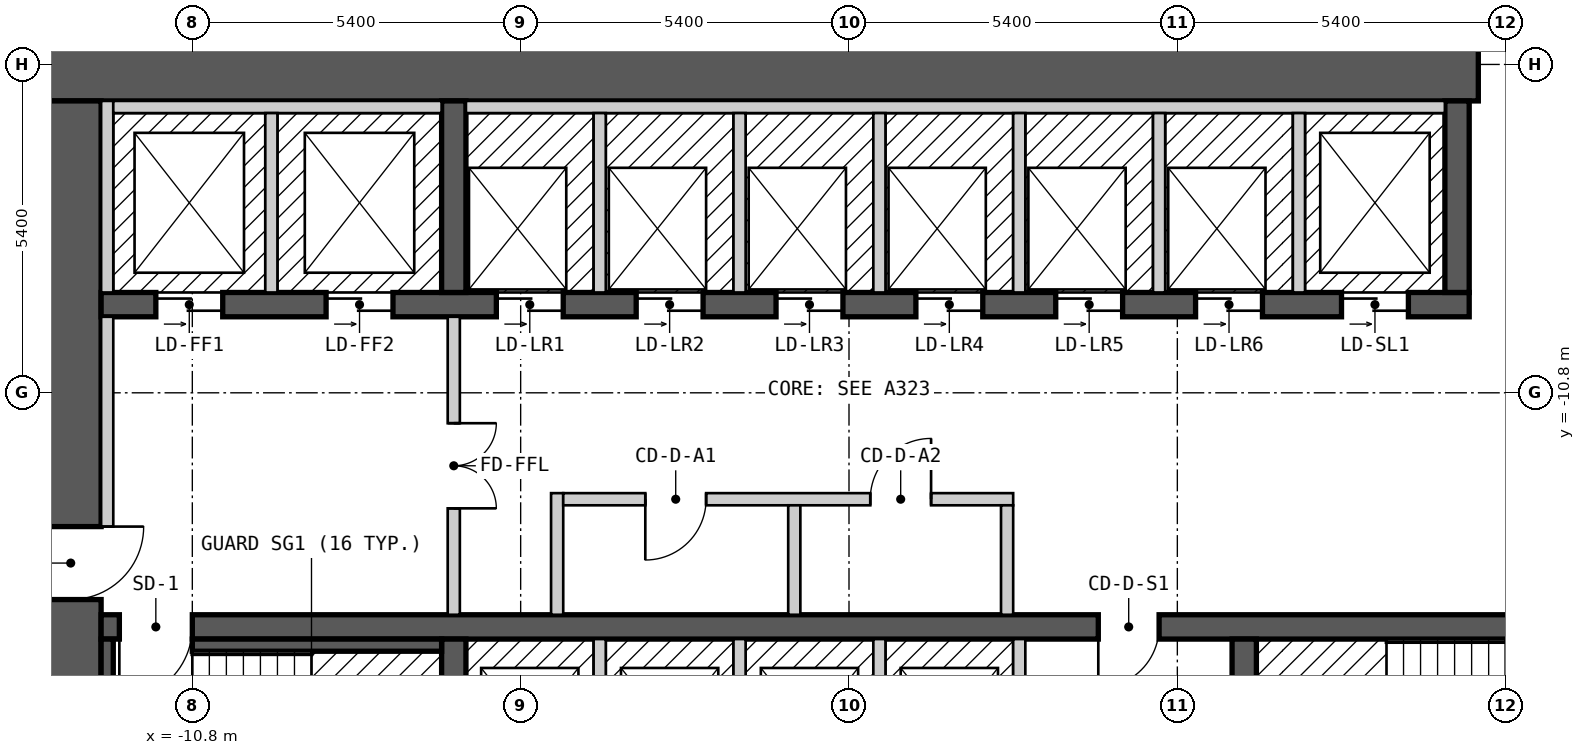
"""IFC4 building model, lengths in metres.
Left out: names, types, materials, properties, quantities, classifications, styles, units other than length and angle.
Written with IfcOpenShell. Run it as: python <this file> out.ifc"""

import sys

from ifc_helpers import new_model, si_unit, direction, frame, frame_2d, origin, place, context, subcontext, project, spatial, rectangle, extrude, element, fill, save


model = new_model("IFC4")
c1 = context("Model", 3, precision=1e-05, world=origin(), true_north=direction((0.0, 1.0)))
c2 = subcontext(c1, "Body", "Model", "MODEL_VIEW")
j1 = project(units=[si_unit("LENGTHUNIT", "METRE"), si_unit("PLANEANGLEUNIT", "RADIAN")], contexts=[c1])
p1 = place(None, origin())
s1 = spatial("IfcSite", under=j1, at=p1, CompositionType="ELEMENT")
p2 = place(p1, origin())
s2 = spatial("IfcBuilding", under=s1, at=p2, CompositionType="ELEMENT")
p3 = place(p2, frame((0.0, 0.0, 75.0)))
s3 = spatial("IfcBuildingStorey", under=s2, at=p3, CompositionType="ELEMENT", Elevation=75.0)
p4 = place(p3, frame((-13.3, -5.5, 0.0), z_axis=(0.0, 0.0, 1.0), x_axis=(1.0, 0.0, 0.0)))
e1 = element("IfcWall", 1, at=p4, inside=s3, PredefinedType="SHEAR", context=c2, shape_type="SweptSolid", body=[
    extrude(rectangle(XDim=26.6, YDim=1.0, at=frame_2d((13.3, 0.0))), origin(), (0.0, 0.0, 1.0), 2.7),
])
p5 = place(p4, frame((23.65, 0.0, 0.0)))
e2 = element("IfcOpeningElement", 2, at=p5, cuts=e1, PredefinedType="OPENING", context=c2, shape_type="SweptSolid", body=[
    extrude(rectangle(XDim=1.2, YDim=2.1, at=frame_2d((0.6, 1.05))), frame((0.0, 0.51, 0.0), z_axis=(0.0, -1.0, 0.0), x_axis=(1.0, 0.0, 0.0)), (0.0, 0.0, 1.0), 1.02),
])
p6 = place(p3, frame((-12.8, -18.0, 0.0), z_axis=(0.0, 0.0, 1.0), x_axis=(0.0, 1.0, 0.0)))
e3 = element("IfcWall", 3, at=p6, inside=s3, PredefinedType="SHEAR", context=c2, shape_type="SweptSolid", body=[
    extrude(rectangle(XDim=12.0, YDim=1.0, at=frame_2d((6.0, 0.0))), origin(), (0.0, 0.0, 1.0), 2.7),
])
p7 = place(p6, frame((3.8, 0.0, 0.0)))
e4 = element("IfcOpeningElement", 4, at=p7, cuts=e3, PredefinedType="OPENING", context=c2, shape_type="SweptSolid", body=[
    extrude(rectangle(XDim=1.2, YDim=2.1, at=frame_2d((0.6, 1.05))), frame((0.0, 0.51, 0.0), z_axis=(0.0, -1.0, 0.0), x_axis=(1.0, 0.0, 0.0)), (0.0, 0.0, 1.0), 1.02),
])
p8 = place(p3, frame((-12.3, -14.65, 0.0), z_axis=(0.0, 0.0, 1.0), x_axis=(1.0, 0.0, 0.0)))
e5 = element("IfcWall", 5, at=p8, inside=s3, PredefinedType="SHEAR", context=c2, shape_type="SweptSolid", body=[
    extrude(rectangle(XDim=24.6, YDim=0.4, at=frame_2d((12.3, 0.0))), origin(), (0.0, 0.0, 1.0), 2.7),
])
p9 = place(p8, frame((1.5, 0.0, 0.0), z_axis=(0.0, 0.0, 1.0), x_axis=(-1.0, 0.0, 0.0)))
e6 = element("IfcOpeningElement", 6, at=p9, cuts=e5, PredefinedType="OPENING", context=c2, shape_type="SweptSolid", body=[
    extrude(rectangle(XDim=1.2, YDim=2.1, at=frame_2d((0.6, 1.05))), frame((0.0, 0.21, 0.0), z_axis=(0.0, -1.0, 0.0), x_axis=(1.0, 0.0, 0.0)), (0.0, 0.0, 1.0), 0.42),
])
p10 = place(p8, frame((24.35, 0.0, 0.0), z_axis=(0.0, 0.0, 1.0), x_axis=(-1.0, 0.0, 0.0)))
e7 = element("IfcOpeningElement", 7, at=p10, cuts=e5, PredefinedType="OPENING", context=c2, shape_type="SweptSolid", body=[
    extrude(rectangle(XDim=1.2, YDim=2.1, at=frame_2d((0.6, 1.05))), frame((0.0, 0.21, 0.0), z_axis=(0.0, -1.0, 0.0), x_axis=(1.0, 0.0, 0.0)), (0.0, 0.0, 1.0), 0.42),
])
p11 = place(p8, frame((17.4, 0.0, 0.0), z_axis=(0.0, 0.0, 1.0), x_axis=(-1.0, 0.0, 0.0)))
e8 = element("IfcOpeningElement", 8, at=p11, cuts=e5, PredefinedType="OPENING", context=c2, shape_type="SweptSolid", body=[
    extrude(rectangle(XDim=1.0, YDim=2.1, at=frame_2d((0.5, 1.05))), frame((0.0, 0.21, 0.0), z_axis=(0.0, -1.0, 0.0), x_axis=(1.0, 0.0, 0.0)), (0.0, 0.0, 1.0), 0.42),
])
p12 = place(p3, frame((-12.3, -9.35, 0.0), z_axis=(0.0, 0.0, 1.0), x_axis=(1.0, 0.0, 0.0)))
e9 = element("IfcWall", 9, at=p12, inside=s3, PredefinedType="SHEAR", context=c2, shape_type="SweptSolid", body=[
    extrude(rectangle(XDim=22.5, YDim=0.4, at=frame_2d((11.25, 0.0))), origin(), (0.0, 0.0, 1.0), 2.7),
])
p13 = place(p12, frame((0.9, 0.0, 0.0)))
e10 = element("IfcOpeningElement", 10, at=p13, cuts=e9, PredefinedType="OPENING", context=c2, shape_type="SweptSolid", body=[
    extrude(rectangle(XDim=1.1, YDim=2.1, at=frame_2d((0.55, 1.05))), frame((0.0, 0.21, 0.0), z_axis=(0.0, -1.0, 0.0), x_axis=(1.0, 0.0, 0.0)), (0.0, 0.0, 1.0), 0.42),
])
p14 = place(p12, frame((3.7, 0.0, 0.0)))
e11 = element("IfcOpeningElement", 11, at=p14, cuts=e9, PredefinedType="OPENING", context=c2, shape_type="SweptSolid", body=[
    extrude(rectangle(XDim=1.1, YDim=2.1, at=frame_2d((0.55, 1.05))), frame((0.0, 0.21, 0.0), z_axis=(0.0, -1.0, 0.0), x_axis=(1.0, 0.0, 0.0)), (0.0, 0.0, 1.0), 0.42),
])
p15 = place(p12, frame((6.5, 0.0, 0.0)))
e12 = element("IfcOpeningElement", 12, at=p15, cuts=e9, PredefinedType="OPENING", context=c2, shape_type="SweptSolid", body=[
    extrude(rectangle(XDim=1.1, YDim=2.1, at=frame_2d((0.55, 1.05))), frame((0.0, 0.21, 0.0), z_axis=(0.0, -1.0, 0.0), x_axis=(1.0, 0.0, 0.0)), (0.0, 0.0, 1.0), 0.42),
])
p16 = place(p12, frame((8.8, 0.0, 0.0)))
e13 = element("IfcOpeningElement", 13, at=p16, cuts=e9, PredefinedType="OPENING", context=c2, shape_type="SweptSolid", body=[
    extrude(rectangle(XDim=1.1, YDim=2.1, at=frame_2d((0.55, 1.05))), frame((0.0, 0.21, 0.0), z_axis=(0.0, -1.0, 0.0), x_axis=(1.0, 0.0, 0.0)), (0.0, 0.0, 1.0), 0.42),
])
p17 = place(p12, frame((11.1, 0.0, 0.0)))
e14 = element("IfcOpeningElement", 14, at=p17, cuts=e9, PredefinedType="OPENING", context=c2, shape_type="SweptSolid", body=[
    extrude(rectangle(XDim=1.1, YDim=2.1, at=frame_2d((0.55, 1.05))), frame((0.0, 0.21, 0.0), z_axis=(0.0, -1.0, 0.0), x_axis=(1.0, 0.0, 0.0)), (0.0, 0.0, 1.0), 0.42),
])
p18 = place(p12, frame((13.4, 0.0, 0.0)))
e15 = element("IfcOpeningElement", 15, at=p18, cuts=e9, PredefinedType="OPENING", context=c2, shape_type="SweptSolid", body=[
    extrude(rectangle(XDim=1.1, YDim=2.1, at=frame_2d((0.55, 1.05))), frame((0.0, 0.21, 0.0), z_axis=(0.0, -1.0, 0.0), x_axis=(1.0, 0.0, 0.0)), (0.0, 0.0, 1.0), 0.42),
])
p19 = place(p12, frame((15.7, 0.0, 0.0)))
e16 = element("IfcOpeningElement", 16, at=p19, cuts=e9, PredefinedType="OPENING", context=c2, shape_type="SweptSolid", body=[
    extrude(rectangle(XDim=1.1, YDim=2.1, at=frame_2d((0.55, 1.05))), frame((0.0, 0.21, 0.0), z_axis=(0.0, -1.0, 0.0), x_axis=(1.0, 0.0, 0.0)), (0.0, 0.0, 1.0), 0.42),
])
p20 = place(p12, frame((18.0, 0.0, 0.0)))
e17 = element("IfcOpeningElement", 17, at=p20, cuts=e9, PredefinedType="OPENING", context=c2, shape_type="SweptSolid", body=[
    extrude(rectangle(XDim=1.1, YDim=2.1, at=frame_2d((0.55, 1.05))), frame((0.0, 0.21, 0.0), z_axis=(0.0, -1.0, 0.0), x_axis=(1.0, 0.0, 0.0)), (0.0, 0.0, 1.0), 0.42),
])
p21 = place(p12, frame((20.4, 0.0, 0.0)))
e18 = element("IfcOpeningElement", 18, at=p21, cuts=e9, PredefinedType="OPENING", context=c2, shape_type="SweptSolid", body=[
    extrude(rectangle(XDim=1.1, YDim=2.1, at=frame_2d((0.55, 1.05))), frame((0.0, 0.21, 0.0), z_axis=(0.0, -1.0, 0.0), x_axis=(1.0, 0.0, 0.0)), (0.0, 0.0, 1.0), 0.42),
])
for number, where, z_axis, x_axis in (
    (19, (-6.5, -18.0, 0.0), (0.0, 0.0, 1.0), (0.0, 1.0, 0.0)),
    (20, (6.5, -18.0, 0.0), (0.0, 0.0, 1.0), (0.0, 1.0, 0.0)),
    (21, (-6.5, -9.15, 0.0), (0.0, 0.0, 1.0), (0.0, 1.0, 0.0)),
    (22, (10.0, -9.15, 0.0), (0.0, 0.0, 1.0), (0.0, 1.0, 0.0)),
):
    element("IfcWall", number, at=place(p3, frame(where, z_axis=z_axis, x_axis=x_axis)), inside=s3, PredefinedType="SHEAR", context=c2, shape_type="SweptSolid", body=[
        extrude(rectangle(XDim=3.15, YDim=0.4, at=frame_2d((1.575, 0.0))), origin(), (0.0, 0.0, 1.0), 2.7),
    ])
p22 = place(p3, frame((-12.2, -18.0, 0.0), z_axis=(0.0, 0.0, 1.0), x_axis=(0.0, 1.0, 0.0)))
e23 = element("IfcWall", 23, at=p22, inside=s3, PredefinedType="SOLIDWALL", context=c2, shape_type="SweptSolid", body=[
    extrude(rectangle(XDim=3.15, YDim=0.2, at=frame_2d((1.575, 0.0))), origin(), (0.0, 0.0, 1.0), 2.7),
])
p23 = place(p3, frame((-12.2, -13.0, 0.0), z_axis=(0.0, 0.0, 1.0), x_axis=(0.0, 1.0, 0.0)))
e24 = element("IfcWall", 24, at=p23, inside=s3, PredefinedType="PARTITIONING", context=c2, shape_type="SweptSolid", body=[
    extrude(rectangle(XDim=3.45, YDim=0.2, at=frame_2d((1.725, 0.0))), origin(), (0.0, 0.0, 1.0), 2.7),
])
p24 = place(p3, frame((-12.2, -9.15, 0.0), z_axis=(0.0, 0.0, 1.0), x_axis=(0.0, 1.0, 0.0)))
e25 = element("IfcWall", 25, at=p24, inside=s3, PredefinedType="SOLIDWALL", context=c2, shape_type="SweptSolid", body=[
    extrude(rectangle(XDim=3.15, YDim=0.2, at=frame_2d((1.575, 0.0))), origin(), (0.0, 0.0, 1.0), 2.7),
])
p25 = place(p3, frame((-12.1, -6.1, 0.0), z_axis=(0.0, 0.0, 1.0), x_axis=(1.0, 0.0, 0.0)))
e26 = element("IfcWall", 26, at=p25, inside=s3, PredefinedType="SOLIDWALL", context=c2, shape_type="SweptSolid", body=[
    extrude(rectangle(XDim=5.4, YDim=0.2, at=frame_2d((2.7, 0.0))), origin(), (0.0, 0.0, 1.0), 2.7),
])
p26 = place(p3, frame((-10.8, -14.95, 0.0), z_axis=(0.0, 0.0, 1.0), x_axis=(1.0, 0.0, 0.0)))
e27 = element("IfcWall", 27, at=p26, inside=s3, PredefinedType="SOLIDWALL", context=c2, shape_type="SweptSolid", body=[
    extrude(rectangle(XDim=4.1, YDim=0.2, at=frame_2d((2.05, 0.0))), origin(), (0.0, 0.0, 1.0), 2.7),
])
p27 = place(p3, frame((-9.5, -9.15, 0.0), z_axis=(0.0, 0.0, 1.0), x_axis=(0.0, 1.0, 0.0)))
e28 = element("IfcWall", 28, at=p27, inside=s3, PredefinedType="SOLIDWALL", context=c2, shape_type="SweptSolid", body=[
    extrude(rectangle(XDim=2.95, YDim=0.2, at=frame_2d((1.475, 0.0))), origin(), (0.0, 0.0, 1.0), 2.7),
])
p28 = place(p3, frame((-6.5, -14.45, 0.0), z_axis=(0.0, 0.0, 1.0), x_axis=(0.0, 1.0, 0.0)))
e29 = element("IfcWall", 29, at=p28, inside=s3, PredefinedType="PARTITIONING", context=c2, shape_type="SweptSolid", body=[
    extrude(rectangle(XDim=4.9, YDim=0.2, at=frame_2d((2.45, 0.0))), origin(), (0.0, 0.0, 1.0), 2.7),
])
p29 = place(p28, frame((3.15, 0.0, 0.0), z_axis=(0.0, 0.0, 1.0), x_axis=(-1.0, 0.0, 0.0)))
e30 = element("IfcOpeningElement", 30, at=p29, cuts=e29, PredefinedType="OPENING", context=c2, shape_type="SweptSolid", body=[
    extrude(rectangle(XDim=1.4, YDim=2.1, at=frame_2d((0.7, 1.05))), frame((0.0, 0.11, 0.0), z_axis=(0.0, -1.0, 0.0), x_axis=(1.0, 0.0, 0.0)), (0.0, 0.0, 1.0), 0.22),
])
p30 = place(p3, frame((-6.3, -6.1, 0.0), z_axis=(0.0, 0.0, 1.0), x_axis=(1.0, 0.0, 0.0)))
e31 = element("IfcWall", 31, at=p30, inside=s3, PredefinedType="SOLIDWALL", context=c2, shape_type="SweptSolid", body=[
    extrude(rectangle(XDim=16.1, YDim=0.2, at=frame_2d((8.05, 0.0))), origin(), (0.0, 0.0, 1.0), 2.7),
])
p31 = place(p3, frame((-4.8, -14.45, 0.0), z_axis=(0.0, 0.0, 1.0), x_axis=(0.0, 1.0, 0.0)))
e32 = element("IfcWall", 32, at=p31, inside=s3, PredefinedType="PARTITIONING", context=c2, shape_type="SweptSolid", body=[
    extrude(rectangle(XDim=2.0, YDim=0.2, at=frame_2d((1.0, 0.0))), origin(), (0.0, 0.0, 1.0), 2.7),
])
p32 = place(p3, frame((-4.7, -12.55, 0.0), z_axis=(0.0, 0.0, 1.0), x_axis=(1.0, 0.0, 0.0)))
e33 = element("IfcWall", 33, at=p32, inside=s3, PredefinedType="PARTITIONING", context=c2, shape_type="SweptSolid", body=[
    extrude(rectangle(XDim=7.4, YDim=0.2, at=frame_2d((3.7, 0.0))), origin(), (0.0, 0.0, 1.0), 2.7),
])
p33 = place(p32, frame((2.35, 0.0, 0.0), z_axis=(0.0, 0.0, 1.0), x_axis=(-1.0, 0.0, 0.0)))
e34 = element("IfcOpeningElement", 34, at=p33, cuts=e33, PredefinedType="OPENING", context=c2, shape_type="SweptSolid", body=[
    extrude(rectangle(XDim=1.0, YDim=2.1, at=frame_2d((0.5, 1.05))), frame((0.0, 0.11, 0.0), z_axis=(0.0, -1.0, 0.0), x_axis=(1.0, 0.0, 0.0)), (0.0, 0.0, 1.0), 0.22),
])
p34 = place(p32, frame((6.05, 0.0, 0.0), z_axis=(0.0, 0.0, 1.0), x_axis=(-1.0, 0.0, 0.0)))
e35 = element("IfcOpeningElement", 35, at=p34, cuts=e33, PredefinedType="OPENING", context=c2, shape_type="SweptSolid", body=[
    extrude(rectangle(XDim=1.0, YDim=2.1, at=frame_2d((0.5, 1.05))), frame((0.0, 0.11, 0.0), z_axis=(0.0, -1.0, 0.0), x_axis=(1.0, 0.0, 0.0)), (0.0, 0.0, 1.0), 0.22),
])
for number, where, z_axis, x_axis in (
    (36, (-4.1, -17.8, 0.0), (0.0, 0.0, 1.0), (0.0, 1.0, 0.0)),
    (37, (-4.1, -9.15, 0.0), (0.0, 0.0, 1.0), (0.0, 1.0, 0.0)),
    (38, (-1.8, -17.8, 0.0), (0.0, 0.0, 1.0), (0.0, 1.0, 0.0)),
    (39, (-1.8, -9.15, 0.0), (0.0, 0.0, 1.0), (0.0, 1.0, 0.0)),
):
    element("IfcWall", number, at=place(p3, frame(where, z_axis=z_axis, x_axis=x_axis)), inside=s3, PredefinedType="SOLIDWALL", context=c2, shape_type="SweptSolid", body=[
        extrude(rectangle(XDim=2.95, YDim=0.2, at=frame_2d((1.475, 0.0))), origin(), (0.0, 0.0, 1.0), 2.7),
    ])
p35 = place(p3, frame((-0.9, -14.45, 0.0), z_axis=(0.0, 0.0, 1.0), x_axis=(0.0, 1.0, 0.0)))
e40 = element("IfcWall", 40, at=p35, inside=s3, PredefinedType="PARTITIONING", context=c2, shape_type="SweptSolid", body=[
    extrude(rectangle(XDim=1.8, YDim=0.2, at=frame_2d((0.9, 0.0))), origin(), (0.0, 0.0, 1.0), 2.7),
])
for number, where, z_axis, x_axis in (
    (41, (0.5, -17.8, 0.0), (0.0, 0.0, 1.0), (0.0, 1.0, 0.0)),
    (42, (0.5, -9.15, 0.0), (0.0, 0.0, 1.0), (0.0, 1.0, 0.0)),
):
    element("IfcWall", number, at=place(p3, frame(where, z_axis=z_axis, x_axis=x_axis)), inside=s3, PredefinedType="SOLIDWALL", context=c2, shape_type="SweptSolid", body=[
        extrude(rectangle(XDim=2.95, YDim=0.2, at=frame_2d((1.475, 0.0))), origin(), (0.0, 0.0, 1.0), 2.7),
    ])
p36 = place(p3, frame((2.6, -14.45, 0.0), z_axis=(0.0, 0.0, 1.0), x_axis=(0.0, 1.0, 0.0)))
e43 = element("IfcWall", 43, at=p36, inside=s3, PredefinedType="PARTITIONING", context=c2, shape_type="SweptSolid", body=[
    extrude(rectangle(XDim=1.8, YDim=0.2, at=frame_2d((0.9, 0.0))), origin(), (0.0, 0.0, 1.0), 2.7),
])
for number, where, z_axis, x_axis in (
    (44, (2.8, -17.8, 0.0), (0.0, 0.0, 1.0), (0.0, 1.0, 0.0)),
    (45, (2.8, -9.15, 0.0), (0.0, 0.0, 1.0), (0.0, 1.0, 0.0)),
    (46, (5.1, -9.15, 0.0), (0.0, 0.0, 1.0), (0.0, 1.0, 0.0)),
    (47, (7.4, -9.15, 0.0), (0.0, 0.0, 1.0), (0.0, 1.0, 0.0)),
):
    element("IfcWall", number, at=place(p3, frame(where, z_axis=z_axis, x_axis=x_axis)), inside=s3, PredefinedType="SOLIDWALL", context=c2, shape_type="SweptSolid", body=[
        extrude(rectangle(XDim=2.95, YDim=0.2, at=frame_2d((1.475, 0.0))), origin(), (0.0, 0.0, 1.0), 2.7),
    ])
p37 = place(p13, origin())
e48 = element("IfcDoor", 48, at=p37, inside=s3, OperationType="DOUBLE_DOOR_SLIDING", PredefinedType="DOOR", context=c2, shape_type="SweptSolid", body=[
    extrude(rectangle(XDim=1.1, YDim=2.1, at=frame_2d((0.55, 1.05))), frame((0.0, 0.025, 0.0), z_axis=(0.0, -1.0, 0.0), x_axis=(1.0, 0.0, 0.0)), (0.0, 0.0, 1.0), 0.05),
])
fill(e10, e48)
p38 = place(p14, origin())
e49 = element("IfcDoor", 49, at=p38, inside=s3, OperationType="DOUBLE_DOOR_SLIDING", PredefinedType="DOOR", context=c2, shape_type="SweptSolid", body=[
    extrude(rectangle(XDim=1.1, YDim=2.1, at=frame_2d((0.55, 1.05))), frame((0.0, 0.025, 0.0), z_axis=(0.0, -1.0, 0.0), x_axis=(1.0, 0.0, 0.0)), (0.0, 0.0, 1.0), 0.05),
])
fill(e11, e49)
p39 = place(p15, origin())
e50 = element("IfcDoor", 50, at=p39, inside=s3, OperationType="DOUBLE_DOOR_SLIDING", PredefinedType="DOOR", context=c2, shape_type="SweptSolid", body=[
    extrude(rectangle(XDim=1.1, YDim=2.1, at=frame_2d((0.55, 1.05))), frame((0.0, 0.025, 0.0), z_axis=(0.0, -1.0, 0.0), x_axis=(1.0, 0.0, 0.0)), (0.0, 0.0, 1.0), 0.05),
])
fill(e12, e50)
p40 = place(p16, origin())
e51 = element("IfcDoor", 51, at=p40, inside=s3, OperationType="DOUBLE_DOOR_SLIDING", PredefinedType="DOOR", context=c2, shape_type="SweptSolid", body=[
    extrude(rectangle(XDim=1.1, YDim=2.1, at=frame_2d((0.55, 1.05))), frame((0.0, 0.025, 0.0), z_axis=(0.0, -1.0, 0.0), x_axis=(1.0, 0.0, 0.0)), (0.0, 0.0, 1.0), 0.05),
])
fill(e13, e51)
p41 = place(p17, origin())
e52 = element("IfcDoor", 52, at=p41, inside=s3, OperationType="DOUBLE_DOOR_SLIDING", PredefinedType="DOOR", context=c2, shape_type="SweptSolid", body=[
    extrude(rectangle(XDim=1.1, YDim=2.1, at=frame_2d((0.55, 1.05))), frame((0.0, 0.025, 0.0), z_axis=(0.0, -1.0, 0.0), x_axis=(1.0, 0.0, 0.0)), (0.0, 0.0, 1.0), 0.05),
])
fill(e14, e52)
p42 = place(p18, origin())
e53 = element("IfcDoor", 53, at=p42, inside=s3, OperationType="DOUBLE_DOOR_SLIDING", PredefinedType="DOOR", context=c2, shape_type="SweptSolid", body=[
    extrude(rectangle(XDim=1.1, YDim=2.1, at=frame_2d((0.55, 1.05))), frame((0.0, 0.025, 0.0), z_axis=(0.0, -1.0, 0.0), x_axis=(1.0, 0.0, 0.0)), (0.0, 0.0, 1.0), 0.05),
])
fill(e15, e53)
p43 = place(p19, origin())
e54 = element("IfcDoor", 54, at=p43, inside=s3, OperationType="DOUBLE_DOOR_SLIDING", PredefinedType="DOOR", context=c2, shape_type="SweptSolid", body=[
    extrude(rectangle(XDim=1.1, YDim=2.1, at=frame_2d((0.55, 1.05))), frame((0.0, 0.025, 0.0), z_axis=(0.0, -1.0, 0.0), x_axis=(1.0, 0.0, 0.0)), (0.0, 0.0, 1.0), 0.05),
])
fill(e16, e54)
p44 = place(p20, origin())
e55 = element("IfcDoor", 55, at=p44, inside=s3, OperationType="DOUBLE_DOOR_SLIDING", PredefinedType="DOOR", context=c2, shape_type="SweptSolid", body=[
    extrude(rectangle(XDim=1.1, YDim=2.1, at=frame_2d((0.55, 1.05))), frame((0.0, 0.025, 0.0), z_axis=(0.0, -1.0, 0.0), x_axis=(1.0, 0.0, 0.0)), (0.0, 0.0, 1.0), 0.05),
])
fill(e17, e55)
p45 = place(p21, origin())
e56 = element("IfcDoor", 56, at=p45, inside=s3, OperationType="DOUBLE_DOOR_SLIDING", PredefinedType="DOOR", context=c2, shape_type="SweptSolid", body=[
    extrude(rectangle(XDim=1.1, YDim=2.1, at=frame_2d((0.55, 1.05))), frame((0.0, 0.025, 0.0), z_axis=(0.0, -1.0, 0.0), x_axis=(1.0, 0.0, 0.0)), (0.0, 0.0, 1.0), 0.05),
])
fill(e18, e56)
p46 = place(p9, origin())
e57 = element("IfcDoor", 57, at=p46, inside=s3, OperationType="SINGLE_SWING_RIGHT", PredefinedType="DOOR", context=c2, shape_type="SweptSolid", body=[
    extrude(rectangle(XDim=1.2, YDim=2.1, at=frame_2d((0.6, 1.05))), frame((0.0, 0.025, 0.0), z_axis=(0.0, -1.0, 0.0), x_axis=(1.0, 0.0, 0.0)), (0.0, 0.0, 1.0), 0.05),
])
fill(e6, e57)
p47 = place(p7, origin())
e58 = element("IfcDoor", 58, at=p47, inside=s3, OperationType="SINGLE_SWING_RIGHT", PredefinedType="DOOR", context=c2, shape_type="SweptSolid", body=[
    extrude(rectangle(XDim=1.2, YDim=2.1, at=frame_2d((0.6, 1.05))), frame((0.0, 0.025, 0.0), z_axis=(0.0, -1.0, 0.0), x_axis=(1.0, 0.0, 0.0)), (0.0, 0.0, 1.0), 0.05),
])
fill(e4, e58)
p48 = place(p29, origin())
e59 = element("IfcDoor", 59, at=p48, inside=s3, OperationType="DOUBLE_DOOR_SINGLE_SWING", PredefinedType="DOOR", context=c2, shape_type="SweptSolid", body=[
    extrude(rectangle(XDim=1.4, YDim=2.1, at=frame_2d((0.7, 1.05))), frame((0.0, 0.025, 0.0), z_axis=(0.0, -1.0, 0.0), x_axis=(1.0, 0.0, 0.0)), (0.0, 0.0, 1.0), 0.05),
])
fill(e30, e59)
p49 = place(p5, origin())
e60 = element("IfcDoor", 60, at=p49, inside=s3, OperationType="DOUBLE_DOOR_SINGLE_SWING", PredefinedType="DOOR", context=c2, shape_type="SweptSolid", body=[
    extrude(rectangle(XDim=1.2, YDim=2.1, at=frame_2d((0.6, 1.05))), frame((0.0, 0.025, 0.0), z_axis=(0.0, -1.0, 0.0), x_axis=(1.0, 0.0, 0.0)), (0.0, 0.0, 1.0), 0.05),
])
fill(e2, e60)
p50 = place(p33, origin())
e61 = element("IfcDoor", 61, at=p50, inside=s3, OperationType="SINGLE_SWING_RIGHT", PredefinedType="DOOR", context=c2, shape_type="SweptSolid", body=[
    extrude(rectangle(XDim=1.0, YDim=2.1, at=frame_2d((0.5, 1.05))), frame((0.0, 0.025, 0.0), z_axis=(0.0, -1.0, 0.0), x_axis=(1.0, 0.0, 0.0)), (0.0, 0.0, 1.0), 0.05),
])
fill(e34, e61)
p51 = place(p34, origin())
e62 = element("IfcDoor", 62, at=p51, inside=s3, OperationType="SINGLE_SWING_LEFT", PredefinedType="DOOR", context=c2, shape_type="SweptSolid", body=[
    extrude(rectangle(XDim=1.0, YDim=2.1, at=frame_2d((0.5, 1.05))), frame((0.0, 0.025, 0.0), z_axis=(0.0, -1.0, 0.0), x_axis=(1.0, 0.0, 0.0)), (0.0, 0.0, 1.0), 0.05),
])
fill(e35, e62)
p52 = place(p11, origin())
e63 = element("IfcDoor", 63, at=p52, inside=s3, OperationType="SINGLE_SWING_RIGHT", PredefinedType="DOOR", context=c2, shape_type="SweptSolid", body=[
    extrude(rectangle(XDim=1.0, YDim=2.1, at=frame_2d((0.5, 1.05))), frame((0.0, 0.025, 0.0), z_axis=(0.0, -1.0, 0.0), x_axis=(1.0, 0.0, 0.0)), (0.0, 0.0, 1.0), 0.05),
])
fill(e8, e63)
save(model, sys.argv[1])
